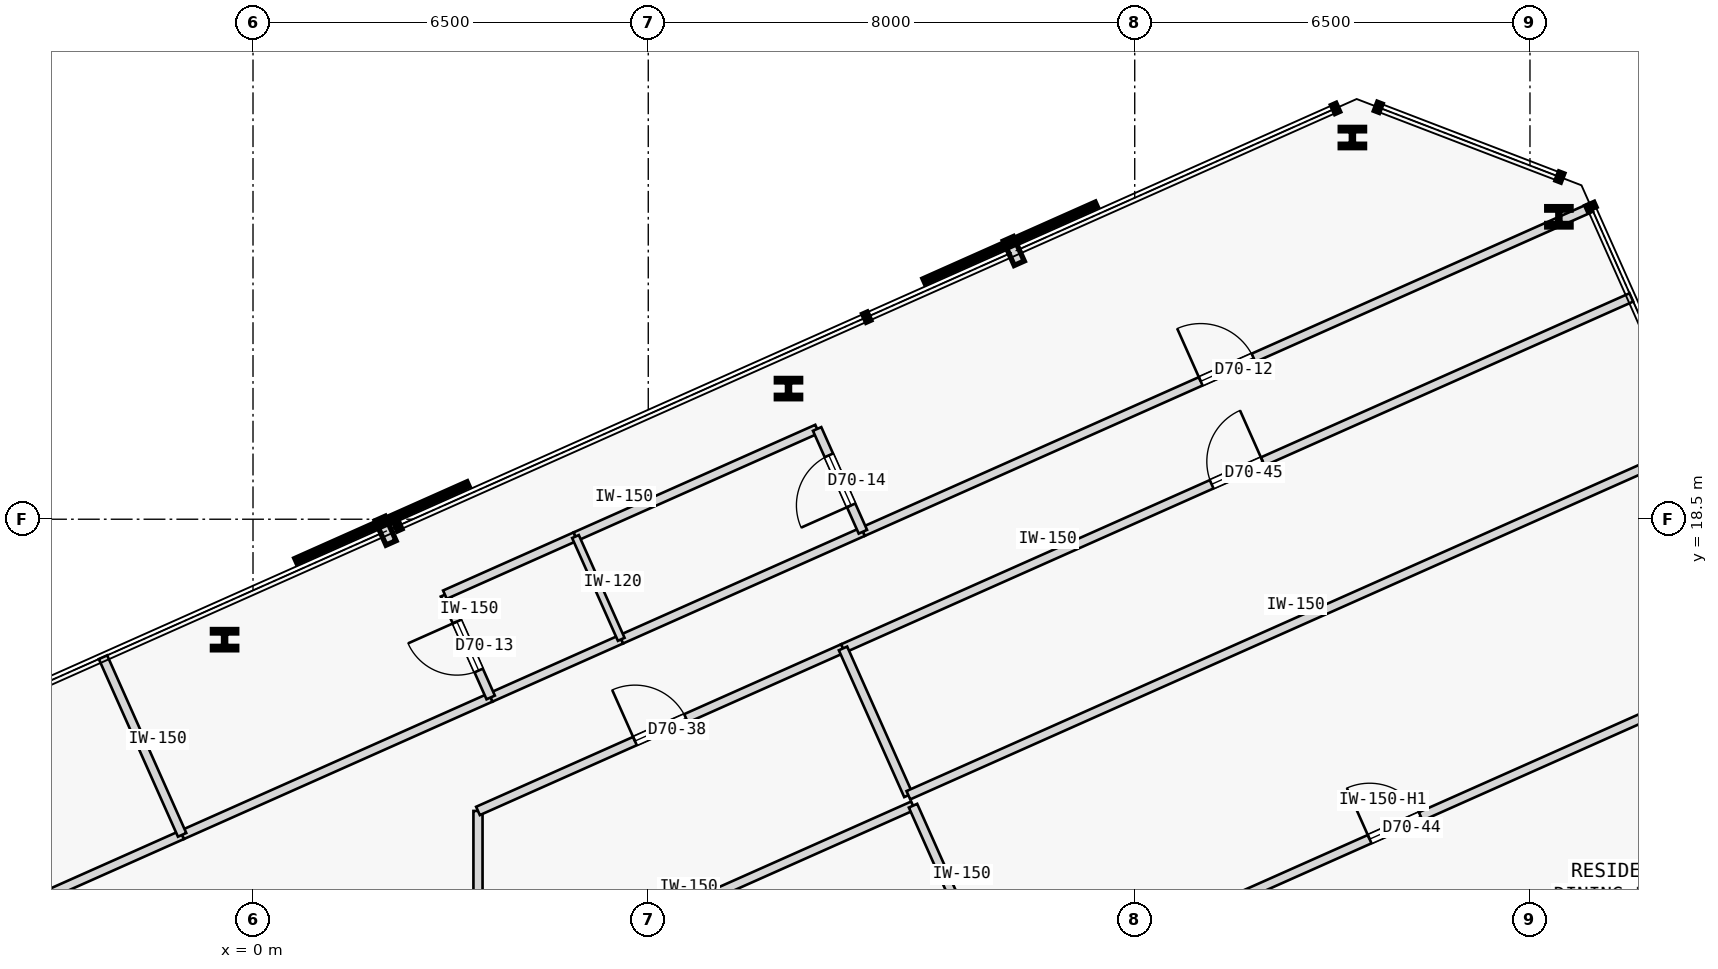
"""IFC4 building model, lengths in metres.
Left out: names, types, materials, properties, quantities, classifications, styles, units other than length and angle.
Written with IfcOpenShell. Run it as: python <this file> out.ifc"""

import sys

from ifc_helpers import new_model, si_unit, direction, frame, frame_2d, origin, origin_2d, place, context, subcontext, project, spatial, rectangle, i_section, extrude, element, fill, save


model = new_model("IFC4")
c1 = context("Model", 3, precision=1e-05, world=origin(), true_north=direction((0.0, 1.0)))
c2 = subcontext(c1, "Body", "Model", "MODEL_VIEW")
j1 = project(units=[si_unit("LENGTHUNIT", "METRE"), si_unit("PLANEANGLEUNIT", "RADIAN")], contexts=[c1])
p1 = place(None, origin())
s1 = spatial("IfcSite", under=j1, at=p1, CompositionType="ELEMENT")
p2 = place(p1, origin())
s2 = spatial("IfcBuilding", under=s1, at=p2, CompositionType="ELEMENT")
p3 = place(p2, frame((0.0, 0.0, 262.2)))
s3 = spatial("IfcBuildingStorey", under=s2, at=p3, CompositionType="ELEMENT", Elevation=262.2)
for number, where, z_axis, x_axis in (
    (1, (21.476, 23.473, 0.0), (0.0, 0.0, 1.0), (1.0, 0.0, 0.0)),
    (2, (18.08, 24.777, 0.0), (0.0, 0.0, 1.0), (1.0, 0.0, 0.0)),
    (3, (8.806, 20.648, 0.0), (0.0, 0.0, 1.0), (1.0, 0.0, 0.0)),
    (4, (-0.468, 16.519, 0.0), (0.0, 0.0, 1.0), (1.0, 0.0, 0.0)),
):
    element("IfcColumn", number, at=place(p3, frame(where, z_axis=z_axis, x_axis=x_axis)), inside=s3, PredefinedType="COLUMN", context=c2, shape_type="SweptSolid", body=[
        extrude(i_section(OverallWidth=0.401, OverallDepth=0.335, WebThickness=0.036, FlangeThickness=0.058, FilletRadius=0.015, at=origin_2d()), origin(), (0.0, 0.0, 1.0), 3.35),
    ])
p4 = place(p3, frame((-17.499, 6.038, 0.0), z_axis=(0.0, 0.0, 1.0), x_axis=(0.913541623157, 0.406745255362, 0.0)))
e5 = element("IfcWall", 5, at=p4, inside=s3, PredefinedType="PARTITIONING", context=c2, shape_type="SweptSolid", body=[
    extrude(rectangle(XDim=17.879, YDim=0.15, at=frame_2d((8.939, 0.0))), origin(), (0.0, 0.0, 1.0), 3.125),
])
p5 = place(p4, frame((8.465, 0.0, 0.0)))
e6 = element("IfcOpeningElement", 6, at=p5, cuts=e5, PredefinedType="OPENING", context=c2, shape_type="SweptSolid", body=[
    extrude(rectangle(XDim=0.95, YDim=2.15, at=frame_2d((0.475, 1.075))), frame((0.0, 0.085, 0.0), z_axis=(0.0, -1.0, 0.0), x_axis=(1.0, 0.0, 0.0)), (0.0, 0.0, 1.0), 0.17),
])
p6 = place(p3, frame((-1.166, 13.31, 0.0), z_axis=(0.0, 0.0, 1.0), x_axis=(0.913554005831, 0.406717442988, 0.0)))
e7 = element("IfcWall", 7, at=p6, inside=s3, PredefinedType="PARTITIONING", context=c2, shape_type="SweptSolid", body=[
    extrude(rectangle(XDim=5.555, YDim=0.15, at=frame_2d((2.777, 0.0))), origin(), (0.0, 0.0, 1.0), 3.125),
])
p7 = place(p3, frame((10.03, 18.294, 0.0), z_axis=(0.0, 0.0, 1.0), x_axis=(0.913545706015, 0.406736085222, 0.0)))
e8 = element("IfcWall", 8, at=p7, inside=s3, PredefinedType="PARTITIONING", context=c2, shape_type="SweptSolid", body=[
    extrude(rectangle(XDim=13.113, YDim=0.15, at=frame_2d((6.557, 0.0))), origin(), (0.0, 0.0, 1.0), 3.125),
])
p8 = place(p7, frame((6.082, 0.0, 0.0)))
e9 = element("IfcOpeningElement", 9, at=p8, cuts=e8, PredefinedType="OPENING", context=c2, shape_type="SweptSolid", body=[
    extrude(rectangle(XDim=0.95, YDim=2.15, at=frame_2d((0.475, 1.075))), frame((0.0, 0.085, 0.0), z_axis=(0.0, -1.0, 0.0), x_axis=(1.0, 0.0, 0.0)), (0.0, 0.0, 1.0), 0.17),
])
p9 = place(p3, frame((3.909, 15.569, 0.0), z_axis=(0.0, 0.0, 1.0), x_axis=(0.913541436194, 0.406745675276, 0.0)))
e10 = element("IfcWall", 10, at=p9, inside=s3, PredefinedType="PARTITIONING", context=c2, shape_type="SweptSolid", body=[
    extrude(rectangle(XDim=2.35, YDim=0.15, at=frame_2d((1.175, 0.0))), origin(), (0.0, 0.0, 1.0), 3.125),
])
p10 = place(p3, frame((6.055, 16.525, 0.0), z_axis=(0.0, 0.0, 1.0), x_axis=(0.913554477336, 0.406716383908, 0.0)))
e11 = element("IfcWall", 11, at=p10, inside=s3, PredefinedType="PARTITIONING", context=c2, shape_type="SweptSolid", body=[
    extrude(rectangle(XDim=4.35, YDim=0.15, at=frame_2d((2.175, 0.0))), origin(), (0.0, 0.0, 1.0), 3.125),
])
p11 = place(p3, frame((3.7, 10.604, 0.0), z_axis=(0.0, 0.0, 1.0), x_axis=(-0.000157567161, 0.999999987586, 0.0)))
e12 = element("IfcWall", 12, at=p11, inside=s3, PredefinedType="PARTITIONING", context=c2, shape_type="SweptSolid", body=[
    extrude(rectangle(XDim=3.099, YDim=0.15, at=frame_2d((1.549, 0.0))), origin(), (0.0, 0.0, 1.0), 2.675),
])
p12 = place(p3, frame((3.7, 13.703, 0.0), z_axis=(0.0, 0.0, 1.0), x_axis=(0.913549363376, 0.406727870542, 0.0)))
e13 = element("IfcWall", 13, at=p12, inside=s3, PredefinedType="PARTITIONING", context=c2, shape_type="SweptSolid", body=[
    extrude(rectangle(XDim=6.571, YDim=0.15, at=frame_2d((3.286, 0.0))), origin(), (0.0, 0.0, 1.0), 3.125),
])
p13 = place(p12, frame((2.825, 0.0, 0.0)))
e14 = element("IfcOpeningElement", 14, at=p13, cuts=e13, PredefinedType="OPENING", context=c2, shape_type="SweptSolid", body=[
    extrude(rectangle(XDim=0.92, YDim=2.15, at=frame_2d((0.46, 1.075))), frame((0.0, 0.085, 0.0), z_axis=(0.0, -1.0, 0.0), x_axis=(1.0, 0.0, 0.0)), (0.0, 0.0, 1.0), 0.17),
])
p14 = place(p3, frame((9.703, 16.375, 0.0), z_axis=(0.0, 0.0, 1.0), x_axis=(0.913544622417, 0.406738519018, 0.0)))
e15 = element("IfcWall", 15, at=p14, inside=s3, PredefinedType="PARTITIONING", context=c2, shape_type="SweptSolid", body=[
    extrude(rectangle(XDim=14.192, YDim=0.15, at=frame_2d((7.096, 0.0))), origin(), (0.0, 0.0, 1.0), 3.125),
])
p15 = place(p14, frame((6.636, 0.0, 0.0)))
e16 = element("IfcOpeningElement", 16, at=p15, cuts=e15, PredefinedType="OPENING", context=c2, shape_type="SweptSolid", body=[
    extrude(rectangle(XDim=0.92, YDim=2.15, at=frame_2d((0.46, 1.075))), frame((0.0, 0.085, 0.0), z_axis=(0.0, -1.0, 0.0), x_axis=(1.0, 0.0, 0.0)), (0.0, 0.0, 1.0), 0.17),
])
p16 = place(p3, frame((-1.166, 13.31, 0.0), z_axis=(0.0, 0.0, 1.0), x_axis=(-0.406761717745, 0.913534293268, 0.0)))
e17 = element("IfcWall", 17, at=p16, inside=s3, PredefinedType="PARTITIONING", context=c2, shape_type="SweptSolid", body=[
    extrude(rectangle(XDim=3.198, YDim=0.15, at=frame_2d((1.599, 0.0))), origin(), (0.0, 0.0, 1.0), 3.125),
])
p17 = place(p3, frame((3.909, 15.569, 0.0), z_axis=(0.0, 0.0, 1.0), x_axis=(-0.406701600856, 0.913561058639, 0.0)))
e18 = element("IfcWall", 18, at=p17, inside=s3, PredefinedType="PARTITIONING", context=c2, shape_type="SweptSolid", body=[
    extrude(rectangle(XDim=1.85, YDim=0.15, at=frame_2d((0.925, 0.0))), origin(), (0.0, 0.0, 1.0), 3.125),
])
p18 = place(p17, frame((0.485, 0.0, 0.0)))
e19 = element("IfcOpeningElement", 19, at=p18, cuts=e18, PredefinedType="OPENING", context=c2, shape_type="SweptSolid", body=[
    extrude(rectangle(XDim=0.88, YDim=2.15, at=frame_2d((0.44, 1.075))), frame((0.0, 0.085, 0.0), z_axis=(0.0, -1.0, 0.0), x_axis=(1.0, 0.0, 0.0)), (0.0, 0.0, 1.0), 0.17),
])
p19 = place(p3, frame((3.156, 17.259, 0.0), z_axis=(0.0, 0.0, 1.0), x_axis=(0.913541436194, 0.406745675276, 0.0)))
e20 = element("IfcWall", 20, at=p19, inside=s3, PredefinedType="PARTITIONING", context=c2, shape_type="SweptSolid", body=[
    extrude(rectangle(XDim=2.35, YDim=0.15, at=frame_2d((1.175, 0.0))), origin(), (0.0, 0.0, 1.0), 3.125),
])
p20 = place(p3, frame((5.303, 18.215, 0.0), z_axis=(0.0, 0.0, 1.0), x_axis=(0.913554477336, 0.406716383908, 0.0)))
e21 = element("IfcWall", 21, at=p20, inside=s3, PredefinedType="PARTITIONING", context=c2, shape_type="SweptSolid", body=[
    extrude(rectangle(XDim=4.35, YDim=0.15, at=frame_2d((2.175, 0.0))), origin(), (0.0, 0.0, 1.0), 3.125),
])
p21 = place(p3, frame((10.03, 18.294, 0.0), z_axis=(0.0, 0.0, 1.0), x_axis=(-0.406701600856, 0.913561058639, 0.0)))
e22 = element("IfcWall", 22, at=p21, inside=s3, PredefinedType="PARTITIONING", context=c2, shape_type="SweptSolid", body=[
    extrude(rectangle(XDim=1.85, YDim=0.15, at=frame_2d((0.925, 0.0))), origin(), (0.0, 0.0, 1.0), 3.125),
])
p22 = place(p21, frame((0.475, 0.0, 0.0)))
e23 = element("IfcOpeningElement", 23, at=p22, cuts=e22, PredefinedType="OPENING", context=c2, shape_type="SweptSolid", body=[
    extrude(rectangle(XDim=0.9, YDim=2.15, at=frame_2d((0.45, 1.075))), frame((0.0, 0.085, 0.0), z_axis=(0.0, -1.0, 0.0), x_axis=(1.0, 0.0, 0.0)), (0.0, 0.0, 1.0), 0.17),
])
p23 = place(p3, frame((6.055, 16.525, 0.0), z_axis=(0.0, 0.0, 1.0), x_axis=(-0.406701600856, 0.913561058639, 0.0)))
e24 = element("IfcWall", 24, at=p23, inside=s3, PredefinedType="PARTITIONING", context=c2, shape_type="SweptSolid", body=[
    extrude(rectangle(XDim=1.85, YDim=0.12, at=frame_2d((0.925, 0.0))), origin(), (0.0, 0.0, 1.0), 3.125),
])
p24 = place(p3, frame((3.7, 10.604, 0.0), z_axis=(0.0, 0.0, 1.0), x_axis=(0.913534926439, 0.406760295722, 0.0)))
e25 = element("IfcWall", 25, at=p24, inside=s3, PredefinedType="PARTITIONING", context=c2, shape_type="SweptSolid", body=[
    extrude(rectangle(XDim=7.831, YDim=0.15, at=frame_2d((3.916, 0.0))), origin(), (0.0, 0.0, 1.0), 3.125),
])
p25 = place(p3, frame((12.054, 11.095, 0.0), z_axis=(0.0, 0.0, 1.0), x_axis=(-0.406798922371, 0.91351772657, 0.0)))
e26 = element("IfcWall", 26, at=p25, inside=s3, PredefinedType="PARTITIONING", context=c2, shape_type="SweptSolid", body=[
    extrude(rectangle(XDim=2.949, YDim=0.15, at=frame_2d((1.475, 0.0))), origin(), (0.0, 0.0, 1.0), 3.125),
])
p26 = place(p3, frame((10.778, 13.961, 0.0), z_axis=(0.0, 0.0, 1.0), x_axis=(-0.406712614091, 0.913556155657, 0.0)))
e27 = element("IfcWall", 27, at=p26, inside=s3, PredefinedType="PARTITIONING", context=c2, shape_type="SweptSolid", body=[
    extrude(rectangle(XDim=2.643, YDim=0.15, at=frame_2d((1.322, 0.0))), origin(), (0.0, 0.0, 1.0), 3.125),
])
p27 = place(p3, frame((12.301, 10.54, 0.0), z_axis=(0.0, 0.0, 1.0), x_axis=(0.913544622417, 0.406738519018, 0.0)))
e28 = element("IfcWall", 28, at=p27, inside=s3, PredefinedType="PARTITIONING", context=c2, shape_type="SweptSolid", body=[
    extrude(rectangle(XDim=14.192, YDim=0.15, at=frame_2d((7.096, 0.0))), origin(), (0.0, 0.0, 1.0), 2.675),
])
p28 = place(p27, frame((6.636, 0.0, 0.0)))
e29 = element("IfcOpeningElement", 29, at=p28, cuts=e28, PredefinedType="OPENING", context=c2, shape_type="SweptSolid", body=[
    extrude(rectangle(XDim=0.92, YDim=2.15, at=frame_2d((0.46, 1.075))), frame((0.0, 0.085, 0.0), z_axis=(0.0, -1.0, 0.0), x_axis=(1.0, 0.0, 0.0)), (0.0, 0.0, 1.0), 0.17),
])
p29 = place(p3, frame((10.778, 13.961, 0.0), z_axis=(0.0, 0.0, 1.0), x_axis=(0.913544622417, 0.406738519018, 0.0)))
e30 = element("IfcWall", 30, at=p29, inside=s3, PredefinedType="PARTITIONING", context=c2, shape_type="SweptSolid", body=[
    extrude(rectangle(XDim=14.192, YDim=0.15, at=frame_2d((7.096, 0.0))), origin(), (0.0, 0.0, 1.0), 3.125),
])
p30 = place(p8, origin())
e31 = element("IfcDoor", 31, at=p30, inside=s3, OperationType="SINGLE_SWING_LEFT", PredefinedType="DOOR", context=c2, shape_type="SweptSolid", body=[
    extrude(rectangle(XDim=0.95, YDim=2.15, at=frame_2d((0.475, 1.075))), frame((0.0, 0.025, 0.0), z_axis=(0.0, -1.0, 0.0), x_axis=(1.0, 0.0, 0.0)), (0.0, 0.0, 1.0), 0.05),
])
fill(e9, e31)
p31 = place(p18, origin())
e32 = element("IfcDoor", 32, at=p31, inside=s3, OperationType="SINGLE_SWING_RIGHT", PredefinedType="DOOR", context=c2, shape_type="SweptSolid", body=[
    extrude(rectangle(XDim=0.88, YDim=2.15, at=frame_2d((0.44, 1.075))), frame((0.0, 0.025, 0.0), z_axis=(0.0, -1.0, 0.0), x_axis=(1.0, 0.0, 0.0)), (0.0, 0.0, 1.0), 0.05),
])
fill(e19, e32)
p32 = place(p22, origin())
e33 = element("IfcDoor", 33, at=p32, inside=s3, OperationType="SINGLE_SWING_LEFT", PredefinedType="DOOR", context=c2, shape_type="SweptSolid", body=[
    extrude(rectangle(XDim=0.9, YDim=2.15, at=frame_2d((0.45, 1.075))), frame((0.0, 0.025, 0.0), z_axis=(0.0, -1.0, 0.0), x_axis=(1.0, 0.0, 0.0)), (0.0, 0.0, 1.0), 0.05),
])
fill(e23, e33)
p33 = place(p13, origin())
e34 = element("IfcDoor", 34, at=p33, inside=s3, OperationType="SINGLE_SWING_LEFT", PredefinedType="DOOR", context=c2, shape_type="SweptSolid", body=[
    extrude(rectangle(XDim=0.92, YDim=2.15, at=frame_2d((0.46, 1.075))), frame((0.0, 0.025, 0.0), z_axis=(0.0, -1.0, 0.0), x_axis=(1.0, 0.0, 0.0)), (0.0, 0.0, 1.0), 0.05),
])
fill(e14, e34)
p34 = place(p28, origin())
e35 = element("IfcDoor", 35, at=p34, inside=s3, OperationType="SINGLE_SWING_LEFT", PredefinedType="DOOR", context=c2, shape_type="SweptSolid", body=[
    extrude(rectangle(XDim=0.92, YDim=2.15, at=frame_2d((0.46, 1.075))), frame((0.0, 0.025, 0.0), z_axis=(0.0, -1.0, 0.0), x_axis=(1.0, 0.0, 0.0)), (0.0, 0.0, 1.0), 0.05),
])
fill(e29, e35)
p35 = place(p15, origin())
e36 = element("IfcDoor", 36, at=p35, inside=s3, OperationType="SINGLE_SWING_RIGHT", PredefinedType="DOOR", context=c2, shape_type="SweptSolid", body=[
    extrude(rectangle(XDim=0.92, YDim=2.15, at=frame_2d((0.46, 1.075))), frame((0.0, 0.025, 0.0), z_axis=(0.0, -1.0, 0.0), x_axis=(1.0, 0.0, 0.0)), (0.0, 0.0, 1.0), 0.05),
])
fill(e16, e36)
save(model, sys.argv[1])
